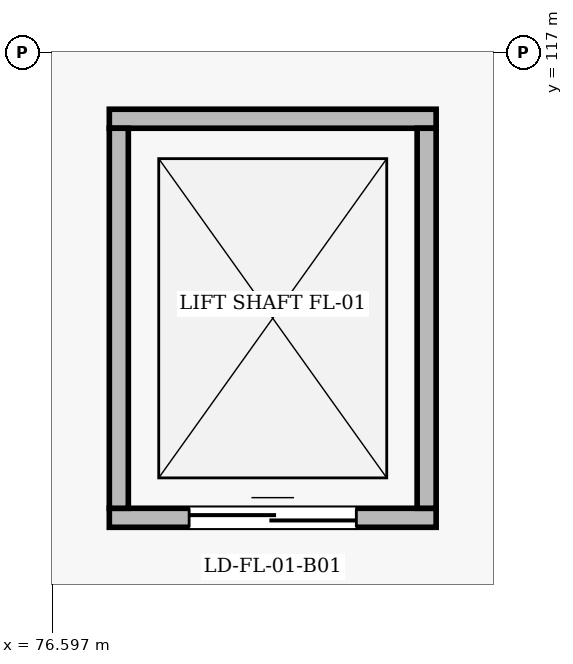
"""IFC4 building model, lengths in metres.
Left out: names, types, materials, properties, quantities, classifications, styles, units other than length and angle.
Written with IfcOpenShell. Run it as: python <this file> out.ifc"""

import sys

from ifc_helpers import new_model, si_unit, direction, frame, frame_2d, origin, place, context, subcontext, project, spatial, rectangle, extrude, element, fill, save


model = new_model("IFC4")
c1 = context("Model", 3, precision=1e-05, world=origin(), true_north=direction((0.0, 1.0)))
c2 = subcontext(c1, "Body", "Model", "MODEL_VIEW")
j1 = project(units=[si_unit("LENGTHUNIT", "METRE"), si_unit("PLANEANGLEUNIT", "RADIAN")], contexts=[c1])
p1 = place(None, origin())
s1 = spatial("IfcSite", under=j1, at=p1, CompositionType="ELEMENT")
p2 = place(p1, origin())
s2 = spatial("IfcBuilding", under=s1, at=p2, CompositionType="ELEMENT")
p3 = place(p2, frame((0.0, 0.0, -5.4)))
s3 = spatial("IfcBuildingStorey", under=s2, at=p3, CompositionType="ELEMENT", Elevation=-5.4)
p4 = place(p3, frame((77.35, 110.875, 0.0), z_axis=(0.0, 0.0, 1.0), x_axis=(1.0, 0.0, 0.0)))
e1 = element("IfcWall", 1, at=p4, inside=s3, PredefinedType="SOLIDWALL", context=c2, shape_type="SweptSolid", body=[
    extrude(rectangle(XDim=4.3, YDim=0.25, at=frame_2d((2.15, 0.0))), origin(), (0.0, 0.0, 1.0), 5.1),
])
p5 = place(p4, frame((1.05, 0.0, 0.0)))
e2 = element("IfcOpeningElement", 2, at=p5, cuts=e1, PredefinedType="OPENING", context=c2, shape_type="SweptSolid", body=[
    extrude(rectangle(XDim=2.2, YDim=2.5, at=frame_2d((1.1, 1.25))), frame((0.0, 0.135, 0.0), z_axis=(0.0, -1.0, 0.0), x_axis=(1.0, 0.0, 0.0)), (0.0, 0.0, 1.0), 0.27),
])
p6 = place(p3, frame((81.65, 116.125, 0.0), z_axis=(0.0, 0.0, 1.0), x_axis=(-1.0, 0.0, 0.0)))
e3 = element("IfcWall", 3, at=p6, inside=s3, PredefinedType="SOLIDWALL", context=c2, shape_type="SweptSolid", body=[
    extrude(rectangle(XDim=4.3, YDim=0.25, at=frame_2d((2.15, 0.0))), origin(), (0.0, 0.0, 1.0), 5.1),
])
for number, where, z_axis, x_axis in (
    (4, (77.475, 116.0, 0.0), (0.0, 0.0, 1.0), (0.0, -1.0, 0.0)),
    (5, (81.525, 111.0, 0.0), (0.0, 0.0, 1.0), (0.0, 1.0, 0.0)),
):
    element("IfcWall", number, at=place(p3, frame(where, z_axis=z_axis, x_axis=x_axis)), inside=s3, PredefinedType="SOLIDWALL", context=c2, shape_type="SweptSolid", body=[
        extrude(rectangle(XDim=5.0, YDim=0.25, at=frame_2d((2.5, 0.0))), origin(), (0.0, 0.0, 1.0), 5.1),
    ])
p7 = place(p5, origin())
e6 = element("IfcDoor", 6, at=p7, inside=s3, OperationType="DOUBLE_DOOR_SLIDING", PredefinedType="DOOR", context=c2, shape_type="SweptSolid", body=[
    extrude(rectangle(XDim=2.2, YDim=2.5, at=frame_2d((1.1, 1.25))), frame((0.0, 0.025, 0.0), z_axis=(0.0, -1.0, 0.0), x_axis=(1.0, 0.0, 0.0)), (0.0, 0.0, 1.0), 0.05),
])
fill(e2, e6)
save(model, sys.argv[1])
